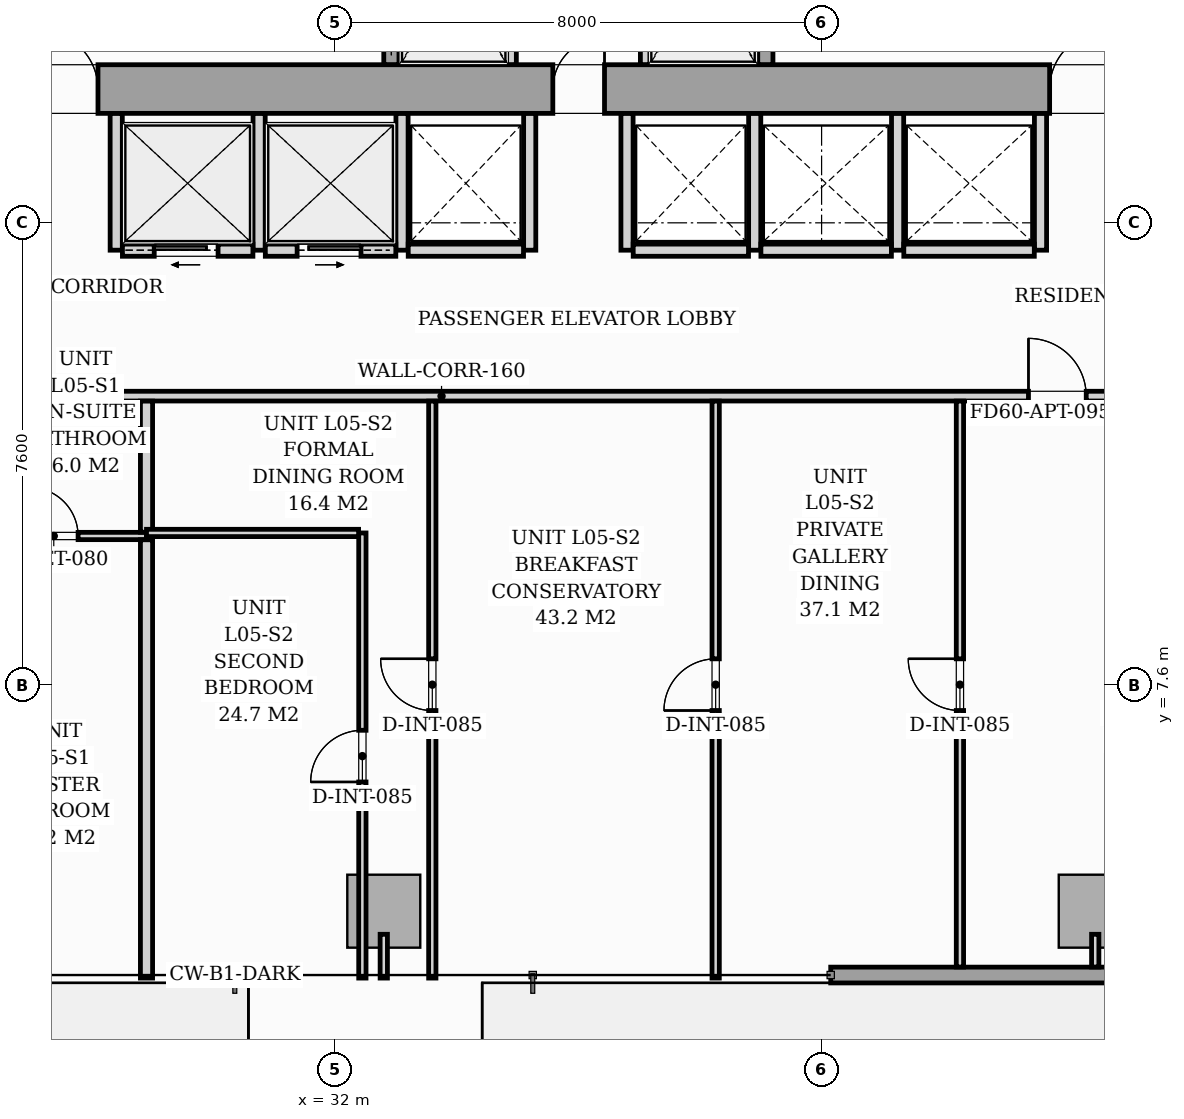
"""IFC4 building model, lengths in metres.
Left out: names, types, materials, properties, quantities, classifications, styles, units other than length and angle.
Written with IfcOpenShell. Run it as: python <this file> out.ifc"""

import sys

from ifc_helpers import new_model, si_unit, direction, frame, frame_2d, origin, origin_2d, place, context, subcontext, project, spatial, rectangle, i_section, extrude, source, transform, mapped, element, fill, save


model = new_model("IFC4")
c1 = context("Model", 3, precision=1e-05, world=origin(), true_north=direction((0.0, 1.0)))
c2 = subcontext(c1, "Body", "Model", "MODEL_VIEW")
j1 = project(units=[si_unit("LENGTHUNIT", "METRE"), si_unit("PLANEANGLEUNIT", "RADIAN")], contexts=[c1])
p1 = place(None, origin())
s1 = spatial("IfcSite", under=j1, at=p1, CompositionType="ELEMENT")
p2 = place(p1, origin())
s2 = spatial("IfcBuilding", under=s1, at=p2, CompositionType="ELEMENT")
p3 = place(p2, frame((0.0, 0.0, 23.0)))
s3 = spatial("IfcBuildingStorey", under=s2, at=p3, CompositionType="ELEMENT", Elevation=23.0)
m1 = source(origin(), c2, "Body", "SweptSolid", [
    extrude(i_section(OverallWidth=0.437, OverallDepth=0.514, WebThickness=0.061, FlangeThickness=0.097, FilletRadius=0.018, at=origin_2d()), origin(), (0.0, 0.0, 1.0), 3.196),
])
for number, where, z_axis, x_axis in (
    (1, (33.12, 17.4, 0.002), (0.0, 0.0, 1.0), (1.0, 0.0, 0.0)),
    (2, (38.88, 17.4, 0.002), (0.0, 0.0, 1.0), (1.0, 0.0, 0.0)),
):
    element("IfcColumn", number, at=place(p3, frame(where, z_axis=z_axis, x_axis=x_axis)), inside=s3, PredefinedType="PILASTER", context=c2, shape_type="MappedRepresentation", body=[
        mapped(m1, transform((0.0, 0.0, 0.0), scale=1.0)),
    ])
m2 = source(origin(), c2, "Body", "SweptSolid", [
    extrude(rectangle(XDim=1.2, YDim=1.2, at=origin_2d()), origin(), (0.0, 0.0, 1.0), 3.194),
])
for number, where, z_axis, x_axis in (
    (3, (32.8, 3.88, 0.004), (0.0, 0.0, 1.0), (1.0, 0.0, 0.0)),
    (4, (44.5, 3.88, 0.004), (0.0, 0.0, 1.0), (1.0, 0.0, 0.0)),
):
    element("IfcColumn", number, at=place(p3, frame(where, z_axis=z_axis, x_axis=x_axis)), inside=s3, PredefinedType="COLUMN", context=c2, shape_type="MappedRepresentation", body=[
        mapped(m2, transform((0.0, 0.0, 0.0), scale=1.0)),
    ])
p4 = place(p3, frame((57.3, 2.83, 0.0), z_axis=(0.0, 0.0, 1.0), x_axis=(-1.0, 0.0, 0.0)))
e5 = element("IfcWall", 5, at=p4, inside=s3, PredefinedType="STANDARD", context=c2, shape_type="SweptSolid", body=[
    extrude(rectangle(XDim=17.15, YDim=0.26, at=frame_2d((8.575, 0.0))), origin(), (0.0, 0.0, 1.0), 2.94),
])
p5 = place(p4, frame((2.826, 0.0, 0.0)))
e6 = element("IfcOpeningElement", 6, at=p5, cuts=e5, PredefinedType="OPENING", context=c2, shape_type="SweptSolid", body=[
    extrude(rectangle(XDim=1.8, YDim=2.06, at=frame_2d((0.9, 1.03))), frame((0.0, 0.14, 0.0), z_axis=(0.0, -1.0, 0.0), x_axis=(1.0, 0.0, 0.0)), (0.0, 0.0, 1.0), 0.28),
])
p6 = place(p4, frame((5.675, 0.0, 0.75)))
e7 = element("IfcOpeningElement", 7, at=p6, cuts=e5, PredefinedType="OPENING", context=c2, shape_type="SweptSolid", body=[
    extrude(rectangle(XDim=1.6, YDim=1.5, at=frame_2d((0.8, 0.75))), frame((0.0, 0.14, 0.0), z_axis=(0.0, -1.0, 0.0), x_axis=(1.0, 0.0, 0.0)), (0.0, 0.0, 1.0), 0.28),
])
p7 = place(p3, frame((26.0, 17.4, 0.0), z_axis=(0.0, 0.0, 1.0), x_axis=(1.0, 0.0, 0.0)))
e8 = element("IfcWall", 8, at=p7, inside=s3, PredefinedType="SHEAR", context=c2, shape_type="SweptSolid", body=[
    extrude(rectangle(XDim=20.0, YDim=0.8, at=frame_2d((10.0, 0.0))), origin(), (0.0, 0.0, 1.0), 3.2),
])
p8 = place(p7, frame((1.15, 0.0, 0.0)))
e9 = element("IfcOpeningElement", 9, at=p8, cuts=e8, PredefinedType="OPENING", context=c2, shape_type="SweptSolid", body=[
    extrude(rectangle(XDim=0.95, YDim=2.06, at=frame_2d((0.475, 1.03))), frame((0.0, 0.41, 0.0), z_axis=(0.0, -1.0, 0.0), x_axis=(1.0, 0.0, 0.0)), (0.0, 0.0, 1.0), 0.82),
])
p9 = place(p7, frame((9.58, 0.0, 0.0)))
e10 = element("IfcOpeningElement", 10, at=p9, cuts=e8, PredefinedType="OPENING", context=c2, shape_type="SweptSolid", body=[
    extrude(rectangle(XDim=0.85, YDim=2.0, at=frame_2d((0.425, 1.0))), frame((0.0, 0.41, 0.0), z_axis=(0.0, -1.0, 0.0), x_axis=(1.0, 0.0, 0.0)), (0.0, 0.0, 1.0), 0.82),
])
p10 = place(p7, frame((17.75, 0.0, 0.0)))
e11 = element("IfcOpeningElement", 11, at=p10, cuts=e8, PredefinedType="OPENING", context=c2, shape_type="SweptSolid", body=[
    extrude(rectangle(XDim=0.95, YDim=2.06, at=frame_2d((0.475, 1.03))), frame((0.0, 0.41, 0.0), z_axis=(0.0, -1.0, 0.0), x_axis=(1.0, 0.0, 0.0)), (0.0, 0.0, 1.0), 0.82),
])
p11 = place(p3, frame((32.925, 17.802, 0.0), z_axis=(0.0, 0.0, 1.0), x_axis=(0.0, 1.0, 0.0)))
e12 = element("IfcWall", 12, at=p11, inside=s3, PredefinedType="SOLIDWALL", context=c2, shape_type="SweptSolid", body=[
    extrude(rectangle(XDim=2.646, YDim=0.25, at=frame_2d((1.323, 0.0))), origin(), (0.0, 0.0, 1.0), 3.2),
])
p12 = place(p11, frame((0.648, 0.0, 0.0)))
e13 = element("IfcOpeningElement", 13, at=p12, cuts=e12, PredefinedType="OPENING", context=c2, shape_type="SweptSolid", body=[
    extrude(rectangle(XDim=1.1, YDim=2.08, at=frame_2d((0.55, 1.04))), frame((0.0, 0.135, 0.0), z_axis=(0.0, -1.0, 0.0), x_axis=(1.0, 0.0, 0.0)), (0.0, 0.0, 1.0), 0.27),
])
for number, where, z_axis, x_axis in (
    (14, (34.9, 17.802, 0.0), (0.0, 0.0, 1.0), (0.0, 1.0, 0.0)),
    (15, (37.1, 17.802, 0.0), (0.0, 0.0, 1.0), (0.0, 1.0, 0.0)),
):
    element("IfcWall", number, at=place(p3, frame(where, z_axis=z_axis, x_axis=x_axis)), inside=s3, PredefinedType="PARTITIONING", context=c2, shape_type="SweptSolid", body=[
        extrude(rectangle(XDim=2.646, YDim=0.16, at=frame_2d((1.323, 0.0))), origin(), (0.0, 0.0, 1.0), 2.94),
    ])
p13 = place(p3, frame((39.075, 17.802, 0.0), z_axis=(0.0, 0.0, 1.0), x_axis=(0.0, 1.0, 0.0)))
e16 = element("IfcWall", 16, at=p13, inside=s3, PredefinedType="SOLIDWALL", context=c2, shape_type="SweptSolid", body=[
    extrude(rectangle(XDim=2.646, YDim=0.25, at=frame_2d((1.323, 0.0))), origin(), (0.0, 0.0, 1.0), 3.2),
])
p14 = place(p13, frame((0.648, 0.0, 0.0)))
e17 = element("IfcOpeningElement", 17, at=p14, cuts=e16, PredefinedType="OPENING", context=c2, shape_type="SweptSolid", body=[
    extrude(rectangle(XDim=1.1, YDim=2.08, at=frame_2d((0.55, 1.04))), frame((0.0, 0.135, 0.0), z_axis=(0.0, -1.0, 0.0), x_axis=(1.0, 0.0, 0.0)), (0.0, 0.0, 1.0), 0.27),
])
for number, where, z_axis, x_axis in (
    (18, (28.4, 14.75, 0.0), (0.0, 0.0, 1.0), (0.0, 1.0, 0.0)),
    (19, (30.75, 14.75, 0.0), (0.0, 0.0, 1.0), (0.0, 1.0, 0.0)),
    (20, (33.1, 14.75, 0.0), (0.0, 0.0, 1.0), (0.0, 1.0, 0.0)),
):
    element("IfcWall", number, at=place(p3, frame(where, z_axis=z_axis, x_axis=x_axis)), inside=s3, PredefinedType="PARTITIONING", context=c2, shape_type="SweptSolid", body=[
        extrude(rectangle(XDim=2.248, YDim=0.2, at=frame_2d((1.124, 0.0))), origin(), (0.0, 0.0, 1.0), 2.94),
    ])
p15 = place(p3, frame((28.502, 14.75, 0.0), z_axis=(0.0, 0.0, 1.0), x_axis=(1.0, 0.0, 0.0)))
e21 = element("IfcWall", 21, at=p15, inside=s3, PredefinedType="PARTITIONING", context=c2, shape_type="SweptSolid", body=[
    extrude(rectangle(XDim=2.146, YDim=0.2, at=frame_2d((1.073, 0.0))), origin(), (0.0, 0.0, 1.0), 2.94),
])
p16 = place(p15, frame((0.523, 0.0, 0.0)))
e22 = element("IfcOpeningElement", 22, at=p16, cuts=e21, PredefinedType="OPENING", context=c2, shape_type="SweptSolid", body=[
    extrude(rectangle(XDim=1.05, YDim=2.08, at=frame_2d((0.525, 1.04))), frame((0.0, 0.11, 0.0), z_axis=(0.0, -1.0, 0.0), x_axis=(1.0, 0.0, 0.0)), (0.0, 0.0, 1.0), 0.22),
])
p17 = place(p3, frame((30.852, 14.75, 0.0), z_axis=(0.0, 0.0, 1.0), x_axis=(1.0, 0.0, 0.0)))
e23 = element("IfcWall", 23, at=p17, inside=s3, PredefinedType="PARTITIONING", context=c2, shape_type="SweptSolid", body=[
    extrude(rectangle(XDim=2.146, YDim=0.2, at=frame_2d((1.073, 0.0))), origin(), (0.0, 0.0, 1.0), 2.94),
])
p18 = place(p17, frame((0.523, 0.0, 0.0)))
e24 = element("IfcOpeningElement", 24, at=p18, cuts=e23, PredefinedType="OPENING", context=c2, shape_type="SweptSolid", body=[
    extrude(rectangle(XDim=1.05, YDim=2.08, at=frame_2d((0.525, 1.04))), frame((0.0, 0.11, 0.0), z_axis=(0.0, -1.0, 0.0), x_axis=(1.0, 0.0, 0.0)), (0.0, 0.0, 1.0), 0.22),
])
p19 = place(p3, frame((35.2, 14.75, 0.0), z_axis=(0.0, 0.0, 1.0), x_axis=(0.0, 1.0, 0.0)))
e25 = element("IfcWall", 25, at=p19, inside=s3, PredefinedType="PARTITIONING", context=c2, shape_type="SweptSolid", body=[
    extrude(rectangle(XDim=2.248, YDim=0.2, at=frame_2d((1.124, 0.0))), origin(), (0.0, 0.0, 1.0), 2.94),
])
p20 = place(p3, frame((33.202, 14.75, 0.0), z_axis=(0.0, 0.0, 1.0), x_axis=(1.0, 0.0, 0.0)))
e26 = element("IfcWall", 26, at=p20, inside=s3, PredefinedType="PARTITIONING", context=c2, shape_type="SweptSolid", body=[
    extrude(rectangle(XDim=1.896, YDim=0.2, at=frame_2d((0.948, 0.0))), origin(), (0.0, 0.0, 1.0), 2.94),
])
for number, where, z_axis, x_axis in (
    (27, (36.8, 14.75, 0.0), (0.0, 0.0, 1.0), (0.0, 1.0, 0.0)),
    (28, (38.9, 14.75, 0.0), (0.0, 0.0, 1.0), (0.0, 1.0, 0.0)),
):
    element("IfcWall", number, at=place(p3, frame(where, z_axis=z_axis, x_axis=x_axis)), inside=s3, PredefinedType="PARTITIONING", context=c2, shape_type="SweptSolid", body=[
        extrude(rectangle(XDim=2.248, YDim=0.2, at=frame_2d((1.124, 0.0))), origin(), (0.0, 0.0, 1.0), 2.94),
    ])
p21 = place(p3, frame((36.902, 14.75, 0.0), z_axis=(0.0, 0.0, 1.0), x_axis=(1.0, 0.0, 0.0)))
e29 = element("IfcWall", 29, at=p21, inside=s3, PredefinedType="PARTITIONING", context=c2, shape_type="SweptSolid", body=[
    extrude(rectangle(XDim=1.896, YDim=0.2, at=frame_2d((0.948, 0.0))), origin(), (0.0, 0.0, 1.0), 2.94),
])
for number, where, z_axis, x_axis in (
    (30, (41.25, 14.75, 0.0), (0.0, 0.0, 1.0), (0.0, 1.0, 0.0)),
    (31, (43.6, 14.75, 0.0), (0.0, 0.0, 1.0), (0.0, 1.0, 0.0)),
):
    element("IfcWall", number, at=place(p3, frame(where, z_axis=z_axis, x_axis=x_axis)), inside=s3, PredefinedType="PARTITIONING", context=c2, shape_type="SweptSolid", body=[
        extrude(rectangle(XDim=2.248, YDim=0.2, at=frame_2d((1.124, 0.0))), origin(), (0.0, 0.0, 1.0), 2.94),
    ])
for number, where, z_axis, x_axis in (
    (32, (39.002, 14.75, 0.0), (0.0, 0.0, 1.0), (1.0, 0.0, 0.0)),
    (33, (41.352, 14.75, 0.0), (0.0, 0.0, 1.0), (1.0, 0.0, 0.0)),
):
    element("IfcWall", number, at=place(p3, frame(where, z_axis=z_axis, x_axis=x_axis)), inside=s3, PredefinedType="PARTITIONING", context=c2, shape_type="SweptSolid", body=[
        extrude(rectangle(XDim=2.146, YDim=0.2, at=frame_2d((1.073, 0.0))), origin(), (0.0, 0.0, 1.0), 2.94),
    ])
p22 = place(p3, frame((15.2, 12.35, 0.0), z_axis=(0.0, 0.0, 1.0), x_axis=(1.0, 0.0, 0.0)))
e34 = element("IfcWall", 34, at=p22, inside=s3, PredefinedType="PARTITIONING", context=c2, shape_type="SweptSolid", body=[
    extrude(rectangle(XDim=37.1, YDim=0.16, at=frame_2d((18.55, 0.0))), origin(), (0.0, 0.0, 1.0), 2.94),
])
p23 = place(p22, frame((2.964, 0.0, 0.0)))
e35 = element("IfcOpeningElement", 35, at=p23, cuts=e34, PredefinedType="OPENING", context=c2, shape_type="SweptSolid", body=[
    extrude(rectangle(XDim=0.95, YDim=2.06, at=frame_2d((0.475, 1.03))), frame((0.0, 0.09, 0.0), z_axis=(0.0, -1.0, 0.0), x_axis=(1.0, 0.0, 0.0)), (0.0, 0.0, 1.0), 0.18),
])
p24 = place(p22, frame((28.202, 0.0, 0.0)))
e36 = element("IfcOpeningElement", 36, at=p24, cuts=e34, PredefinedType="OPENING", context=c2, shape_type="SweptSolid", body=[
    extrude(rectangle(XDim=0.95, YDim=2.06, at=frame_2d((0.475, 1.03))), frame((0.0, 0.09, 0.0), z_axis=(0.0, -1.0, 0.0), x_axis=(1.0, 0.0, 0.0)), (0.0, 0.0, 1.0), 0.18),
])
p25 = place(p3, frame((26.01, 10.05, 0.0), z_axis=(0.0, 0.0, 1.0), x_axis=(1.0, 0.0, 0.0)))
e37 = element("IfcWall", 37, at=p25, inside=s3, PredefinedType="PARTITIONING", context=c2, shape_type="SweptSolid", body=[
    extrude(rectangle(XDim=2.888, YDim=0.12, at=frame_2d((1.444, 0.0))), origin(), (0.0, 0.0, 1.0), 2.94),
])
p26 = place(p25, frame((0.963, 0.0, 0.0)))
e38 = element("IfcOpeningElement", 38, at=p26, cuts=e37, PredefinedType="OPENING", context=c2, shape_type="SweptSolid", body=[
    extrude(rectangle(XDim=0.8, YDim=2.02, at=frame_2d((0.4, 1.01))), frame((0.0, 0.07, 0.0), z_axis=(0.0, -1.0, 0.0), x_axis=(1.0, 0.0, 0.0)), (0.0, 0.0, 1.0), 0.14),
])
p27 = place(p3, frame((28.898, 2.78, 0.0), z_axis=(0.0, 0.0, 1.0), x_axis=(0.0, 1.0, 0.0)))
e39 = element("IfcWall", 39, at=p27, inside=s3, PredefinedType="PARTITIONING", context=c2, shape_type="SweptSolid", body=[
    extrude(rectangle(XDim=7.208, YDim=0.2, at=frame_2d((3.604, 0.0))), origin(), (0.0, 0.0, 1.0), 2.94),
])
p28 = place(p3, frame((28.898, 10.112, 0.0), z_axis=(0.0, 0.0, 1.0), x_axis=(0.0, 1.0, 0.0)))
e40 = element("IfcWall", 40, at=p28, inside=s3, PredefinedType="PARTITIONING", context=c2, shape_type="SweptSolid", body=[
    extrude(rectangle(XDim=2.156, YDim=0.2, at=frame_2d((1.078, 0.0))), origin(), (0.0, 0.0, 1.0), 2.94),
])
p29 = place(p3, frame((32.448, 2.78, 0.0), z_axis=(0.0, 0.0, 1.0), x_axis=(0.0, 1.0, 0.0)))
e41 = element("IfcWall", 41, at=p29, inside=s3, PredefinedType="PARTITIONING", context=c2, shape_type="SweptSolid", body=[
    extrude(rectangle(XDim=7.32, YDim=0.12, at=frame_2d((3.66, 0.0))), origin(), (0.0, 0.0, 1.0), 2.94),
])
p30 = place(p29, frame((3.225, 0.0, 0.0)))
e42 = element("IfcOpeningElement", 42, at=p30, cuts=e41, PredefinedType="OPENING", context=c2, shape_type="SweptSolid", body=[
    extrude(rectangle(XDim=0.85, YDim=2.05, at=frame_2d((0.425, 1.025))), frame((0.0, 0.07, 0.0), z_axis=(0.0, -1.0, 0.0), x_axis=(1.0, 0.0, 0.0)), (0.0, 0.0, 1.0), 0.14),
])
p31 = place(p3, frame((28.898, 10.1, 0.0), z_axis=(0.0, 0.0, 1.0), x_axis=(1.0, 0.0, 0.0)))
e43 = element("IfcWall", 43, at=p31, inside=s3, PredefinedType="PARTITIONING", context=c2, shape_type="SweptSolid", body=[
    extrude(rectangle(XDim=3.488, YDim=0.12, at=frame_2d((1.744, 0.0))), origin(), (0.0, 0.0, 1.0), 2.94),
])
p32 = place(p3, frame((33.598, 2.78, 0.0), z_axis=(0.0, 0.0, 1.0), x_axis=(0.0, 1.0, 0.0)))
e44 = element("IfcWall", 44, at=p32, inside=s3, PredefinedType="PARTITIONING", context=c2, shape_type="SweptSolid", body=[
    extrude(rectangle(XDim=9.488, YDim=0.12, at=frame_2d((4.744, 0.0))), origin(), (0.0, 0.0, 1.0), 2.94),
])
p33 = place(p32, frame((4.4, 0.0, 0.0)))
e45 = element("IfcOpeningElement", 45, at=p33, cuts=e44, PredefinedType="OPENING", context=c2, shape_type="SweptSolid", body=[
    extrude(rectangle(XDim=0.85, YDim=2.05, at=frame_2d((0.425, 1.025))), frame((0.0, 0.07, 0.0), z_axis=(0.0, -1.0, 0.0), x_axis=(1.0, 0.0, 0.0)), (0.0, 0.0, 1.0), 0.14),
])
p34 = place(p3, frame((38.258, 2.78, 0.0), z_axis=(0.0, 0.0, 1.0), x_axis=(0.0, 1.0, 0.0)))
e46 = element("IfcWall", 46, at=p34, inside=s3, PredefinedType="PARTITIONING", context=c2, shape_type="SweptSolid", body=[
    extrude(rectangle(XDim=9.488, YDim=0.12, at=frame_2d((4.744, 0.0))), origin(), (0.0, 0.0, 1.0), 2.94),
])
p35 = place(p34, frame((4.4, 0.0, 0.0)))
e47 = element("IfcOpeningElement", 47, at=p35, cuts=e46, PredefinedType="OPENING", context=c2, shape_type="SweptSolid", body=[
    extrude(rectangle(XDim=0.85, YDim=2.05, at=frame_2d((0.425, 1.025))), frame((0.0, 0.07, 0.0), z_axis=(0.0, -1.0, 0.0), x_axis=(1.0, 0.0, 0.0)), (0.0, 0.0, 1.0), 0.14),
])
p36 = place(p3, frame((42.275, 2.962, 0.0), z_axis=(0.0, 0.0, 1.0), x_axis=(0.0, 1.0, 0.0)))
e48 = element("IfcWall", 48, at=p36, inside=s3, PredefinedType="PARTITIONING", context=c2, shape_type="SweptSolid", body=[
    extrude(rectangle(XDim=9.306, YDim=0.12, at=frame_2d((4.653, 0.0))), origin(), (0.0, 0.0, 1.0), 2.94),
])
p37 = place(p36, frame((4.218, 0.0, 0.0)))
e49 = element("IfcOpeningElement", 49, at=p37, cuts=e48, PredefinedType="OPENING", context=c2, shape_type="SweptSolid", body=[
    extrude(rectangle(XDim=0.85, YDim=2.05, at=frame_2d((0.425, 1.025))), frame((0.0, 0.07, 0.0), z_axis=(0.0, -1.0, 0.0), x_axis=(1.0, 0.0, 0.0)), (0.0, 0.0, 1.0), 0.14),
])
p38 = place(p3, frame((32.8, 3.5, 0.0), z_axis=(0.0, 0.0, 1.0), x_axis=(0.0, -1.0, 0.0)))
e50 = element("IfcWall", 50, at=p38, inside=s3, PredefinedType="PARTITIONING", context=c2, shape_type="SweptSolid", body=[
    extrude(rectangle(XDim=0.72, YDim=0.12, at=frame_2d((0.36, 0.0))), origin(), (0.0, 0.0, 1.0), 2.94),
])
p39 = place(p3, frame((44.5, 3.5, 0.0), z_axis=(0.0, 0.0, 1.0), x_axis=(0.0, -1.0, 0.0)))
e51 = element("IfcWall", 51, at=p39, inside=s3, PredefinedType="PARTITIONING", context=c2, shape_type="SweptSolid", body=[
    extrude(rectangle(XDim=0.538, YDim=0.12, at=frame_2d((0.269, 0.0))), origin(), (0.0, 0.0, 1.0), 2.94),
])
m3 = source(origin(), c2, "Body", "SweptSolid", [
    extrude(rectangle(XDim=0.95, YDim=2.06, at=frame_2d((0.475, 1.03))), frame((0.0, 0.025, 0.0), z_axis=(0.0, -1.0, 0.0), x_axis=(1.0, 0.0, 0.0)), (0.0, 0.0, 1.0), 0.05),
])
p40 = place(p8, origin())
e52 = element("IfcDoor", 52, at=p40, inside=s3, OperationType="SINGLE_SWING_LEFT", PredefinedType="DOOR", context=c2, shape_type="MappedRepresentation", body=[
    mapped(m3, transform((0.0, 0.0, 0.0), scale=1.0)),
])
fill(e9, e52)
m4 = source(origin(), c2, "Body", "SweptSolid", [
    extrude(rectangle(XDim=0.85, YDim=2.0, at=frame_2d((0.425, 1.0))), frame((0.0, 0.025, 0.0), z_axis=(0.0, -1.0, 0.0), x_axis=(1.0, 0.0, 0.0)), (0.0, 0.0, 1.0), 0.05),
])
p41 = place(p9, origin())
e53 = element("IfcDoor", 53, at=p41, inside=s3, OperationType="SINGLE_SWING_RIGHT", PredefinedType="DOOR", context=c2, shape_type="MappedRepresentation", body=[
    mapped(m4, transform((0.0, 0.0, 0.0), scale=1.0)),
])
fill(e10, e53)
p42 = place(p10, origin())
e54 = element("IfcDoor", 54, at=p42, inside=s3, OperationType="SINGLE_SWING_RIGHT", PredefinedType="DOOR", context=c2, shape_type="MappedRepresentation", body=[
    mapped(m3, transform((0.0, 0.0, 0.0), scale=1.0)),
])
fill(e11, e54)
m5 = source(origin(), c2, "Body", "SweptSolid", [
    extrude(rectangle(XDim=1.05, YDim=2.08, at=frame_2d((0.525, 1.04))), frame((0.0, 0.025, 0.0), z_axis=(0.0, -1.0, 0.0), x_axis=(1.0, 0.0, 0.0)), (0.0, 0.0, 1.0), 0.05),
])
p43 = place(p16, origin())
e55 = element("IfcDoor", 55, at=p43, inside=s3, OperationType="SLIDING_TO_LEFT", PredefinedType="DOOR", context=c2, shape_type="MappedRepresentation", body=[
    mapped(m5, transform((0.0, 0.0, 0.0), scale=1.0)),
])
fill(e22, e55)
p44 = place(p18, origin())
e56 = element("IfcDoor", 56, at=p44, inside=s3, OperationType="SLIDING_TO_RIGHT", PredefinedType="DOOR", context=c2, shape_type="MappedRepresentation", body=[
    mapped(m5, transform((0.0, 0.0, 0.0), scale=1.0)),
])
fill(e24, e56)
m6 = source(origin(), c2, "Body", "SweptSolid", [
    extrude(rectangle(XDim=0.8, YDim=2.02, at=frame_2d((0.4, 1.01))), frame((0.0, 0.025, 0.0), z_axis=(0.0, -1.0, 0.0), x_axis=(1.0, 0.0, 0.0)), (0.0, 0.0, 1.0), 0.05),
])
p45 = place(p26, origin())
e57 = element("IfcDoor", 57, at=p45, inside=s3, OperationType="SINGLE_SWING_LEFT", PredefinedType="DOOR", context=c2, shape_type="MappedRepresentation", body=[
    mapped(m6, transform((0.0, 0.0, 0.0), scale=1.0)),
])
fill(e38, e57)
m7 = source(origin(), c2, "Body", "SweptSolid", [
    extrude(rectangle(XDim=0.85, YDim=2.05, at=frame_2d((0.425, 1.025))), frame((0.0, 0.025, 0.0), z_axis=(0.0, -1.0, 0.0), x_axis=(1.0, 0.0, 0.0)), (0.0, 0.0, 1.0), 0.05),
])
p46 = place(p30, origin())
e58 = element("IfcDoor", 58, at=p46, inside=s3, OperationType="SINGLE_SWING_LEFT", PredefinedType="DOOR", context=c2, shape_type="MappedRepresentation", body=[
    mapped(m7, transform((0.0, 0.0, 0.0), scale=1.0)),
])
fill(e42, e58)
p47 = place(p33, origin())
e59 = element("IfcDoor", 59, at=p47, inside=s3, OperationType="SINGLE_SWING_RIGHT", PredefinedType="DOOR", context=c2, shape_type="MappedRepresentation", body=[
    mapped(m7, transform((0.0, 0.0, 0.0), scale=1.0)),
])
fill(e45, e59)
p48 = place(p35, origin())
e60 = element("IfcDoor", 60, at=p48, inside=s3, OperationType="SINGLE_SWING_LEFT", PredefinedType="DOOR", context=c2, shape_type="MappedRepresentation", body=[
    mapped(m7, transform((0.0, 0.0, 0.0), scale=1.0)),
])
fill(e47, e60)
p49 = place(p37, origin())
e61 = element("IfcDoor", 61, at=p49, inside=s3, OperationType="SINGLE_SWING_RIGHT", PredefinedType="DOOR", context=c2, shape_type="MappedRepresentation", body=[
    mapped(m7, transform((0.0, 0.0, 0.0), scale=1.0)),
])
fill(e49, e61)
m8 = source(origin(), c2, "Body", "SweptSolid", [
    extrude(rectangle(XDim=0.95, YDim=2.06, at=frame_2d((0.475, 1.03))), frame((0.0, 0.025, 0.0), z_axis=(0.0, -1.0, 0.0), x_axis=(1.0, 0.0, 0.0)), (0.0, 0.0, 1.0), 0.05),
])
p50 = place(p24, origin())
e62 = element("IfcDoor", 62, at=p50, inside=s3, OperationType="SINGLE_SWING_LEFT", PredefinedType="DOOR", context=c2, shape_type="MappedRepresentation", body=[
    mapped(m8, transform((0.0, 0.0, 0.0), scale=1.0)),
])
fill(e36, e62)
save(model, sys.argv[1])
